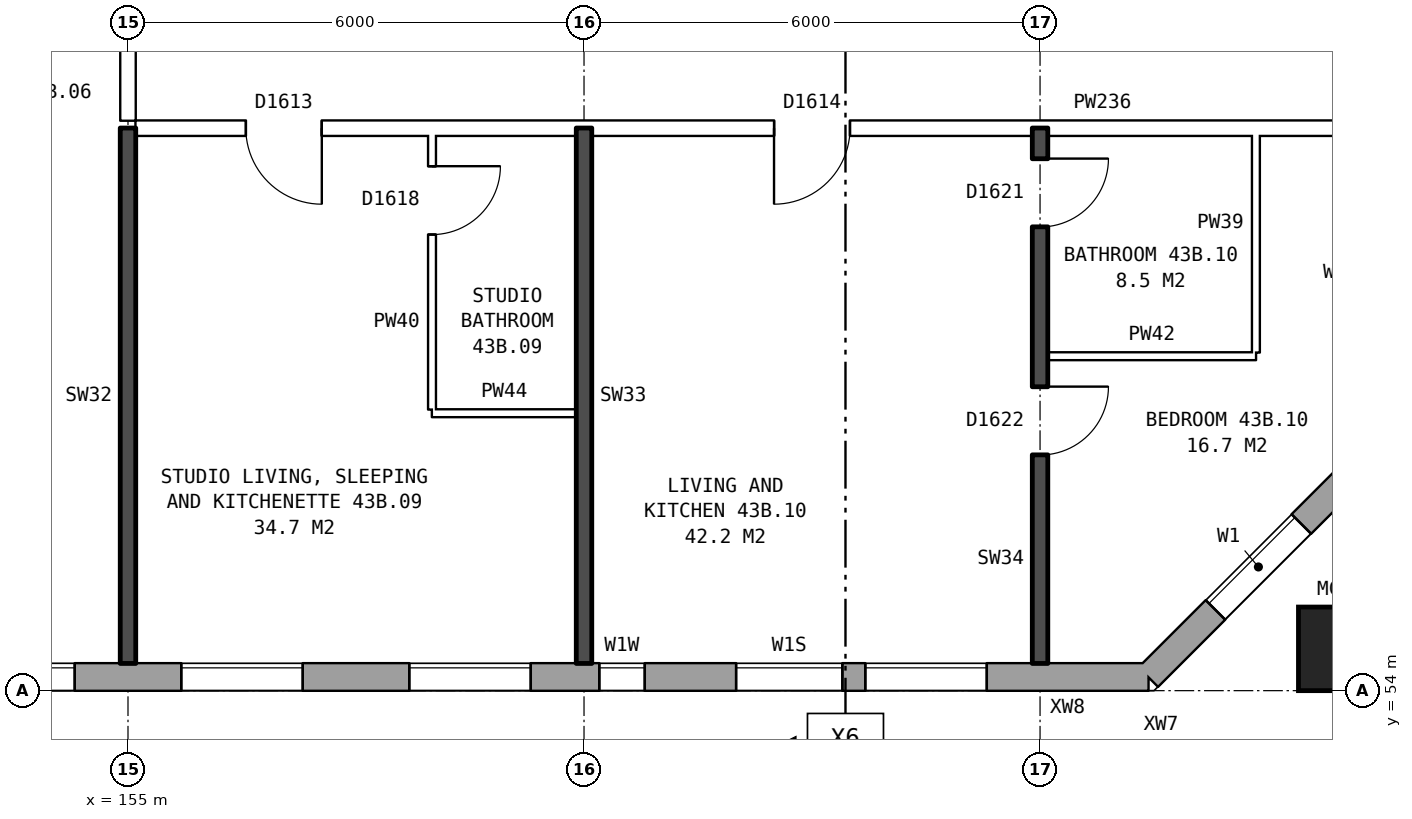
"""IFC4 building model, lengths in metres.
Left out: names, types, materials, properties, quantities, classifications, styles, units other than length and angle.
Written with IfcOpenShell. Run it as: python <this file> out.ifc"""

import sys

from ifc_helpers import new_model, si_unit, direction, frame, frame_2d, origin, origin_2d, place, context, subcontext, project, spatial, rectangle, hollow_rectangle, extrude, element, fill, save


model = new_model("IFC4")
c1 = context("Model", 3, precision=1e-05, world=origin(), true_north=direction((0.0, 1.0)))
c2 = subcontext(c1, "Body", "Model", "MODEL_VIEW")
j1 = project(units=[si_unit("LENGTHUNIT", "METRE"), si_unit("PLANEANGLEUNIT", "RADIAN")], contexts=[c1])
p1 = place(None, origin())
s1 = spatial("IfcSite", under=j1, at=p1, CompositionType="ELEMENT")
p2 = place(p1, origin())
s2 = spatial("IfcBuilding", under=s1, at=p2, CompositionType="ELEMENT")
p3 = place(p2, frame((0.0, 0.0, 154.7)))
s3 = spatial("IfcBuildingStorey", under=s2, at=p3, CompositionType="ELEMENT", Elevation=154.7)
p4 = place(p3, frame((170.95, 54.55, 0.0), z_axis=(0.0, 0.0, 1.0), x_axis=(1.0, 0.0, 0.0)))
e1 = element("IfcColumn", 1, at=p4, inside=s3, PredefinedType="COLUMN", context=c2, shape_type="SweptSolid", body=[
    extrude(hollow_rectangle(XDim=1.1, YDim=1.1, WallThickness=0.06, at=origin_2d()), origin(), (0.0, 0.0, 1.0), 3.1),
])
p5 = place(p3, frame((134.075, 54.18, 0.0), z_axis=(0.0, 0.0, 1.0), x_axis=(1.0, 0.0, 0.0)))
e2 = element("IfcWall", 2, at=p5, inside=s3, PredefinedType="STANDARD", context=c2, shape_type="SweptSolid", body=[
    extrude(rectangle(XDim=34.351, YDim=0.36, at=frame_2d((17.175, 0.0))), origin(), (0.0, 0.0, 1.0), 2.85),
])
p6 = place(p5, frame((0.625, 0.0, 0.8)))
e3 = element("IfcOpeningElement", 3, at=p6, cuts=e2, PredefinedType="OPENING", context=c2, shape_type="SweptSolid", body=[
    extrude(rectangle(XDim=1.6, YDim=1.8, at=frame_2d((0.8, 0.9))), frame((0.0, 0.19, 0.0), z_axis=(0.0, -1.0, 0.0), x_axis=(1.0, 0.0, 0.0)), (0.0, 0.0, 1.0), 0.38),
])
p7 = place(p5, frame((3.125, 0.0, 0.8)))
e4 = element("IfcOpeningElement", 4, at=p7, cuts=e2, PredefinedType="OPENING", context=c2, shape_type="SweptSolid", body=[
    extrude(rectangle(XDim=1.2, YDim=1.8, at=frame_2d((0.6, 0.9))), frame((0.0, 0.19, 0.0), z_axis=(0.0, -1.0, 0.0), x_axis=(1.0, 0.0, 0.0)), (0.0, 0.0, 1.0), 0.38),
])
p8 = place(p5, frame((4.625, 0.0, 1.7)))
e5 = element("IfcOpeningElement", 5, at=p8, cuts=e2, PredefinedType="OPENING", context=c2, shape_type="SweptSolid", body=[
    extrude(rectangle(XDim=0.8, YDim=0.9, at=frame_2d((0.4, 0.45))), frame((0.0, 0.19, 0.0), z_axis=(0.0, -1.0, 0.0), x_axis=(1.0, 0.0, 0.0)), (0.0, 0.0, 1.0), 0.38),
])
p9 = place(p5, frame((9.625, 0.0, 0.8)))
e6 = element("IfcOpeningElement", 6, at=p9, cuts=e2, PredefinedType="OPENING", context=c2, shape_type="SweptSolid", body=[
    extrude(rectangle(XDim=1.6, YDim=1.8, at=frame_2d((0.8, 0.9))), frame((0.0, 0.19, 0.0), z_axis=(0.0, -1.0, 0.0), x_axis=(1.0, 0.0, 0.0)), (0.0, 0.0, 1.0), 0.38),
])
p10 = place(p5, frame((12.625, 0.0, 0.8)))
e7 = element("IfcOpeningElement", 7, at=p10, cuts=e2, PredefinedType="OPENING", context=c2, shape_type="SweptSolid", body=[
    extrude(rectangle(XDim=1.6, YDim=1.8, at=frame_2d((0.8, 0.9))), frame((0.0, 0.19, 0.0), z_axis=(0.0, -1.0, 0.0), x_axis=(1.0, 0.0, 0.0)), (0.0, 0.0, 1.0), 0.38),
])
p11 = place(p5, frame((15.625, 0.0, 0.8)))
e8 = element("IfcOpeningElement", 8, at=p11, cuts=e2, PredefinedType="OPENING", context=c2, shape_type="SweptSolid", body=[
    extrude(rectangle(XDim=1.6, YDim=1.8, at=frame_2d((0.8, 0.9))), frame((0.0, 0.19, 0.0), z_axis=(0.0, -1.0, 0.0), x_axis=(1.0, 0.0, 0.0)), (0.0, 0.0, 1.0), 0.38),
])
p12 = place(p5, frame((18.625, 0.0, 0.8)))
e9 = element("IfcOpeningElement", 9, at=p12, cuts=e2, PredefinedType="OPENING", context=c2, shape_type="SweptSolid", body=[
    extrude(rectangle(XDim=1.6, YDim=1.8, at=frame_2d((0.8, 0.9))), frame((0.0, 0.19, 0.0), z_axis=(0.0, -1.0, 0.0), x_axis=(1.0, 0.0, 0.0)), (0.0, 0.0, 1.0), 0.38),
])
p13 = place(p5, frame((21.625, 0.0, 0.8)))
e10 = element("IfcOpeningElement", 10, at=p13, cuts=e2, PredefinedType="OPENING", context=c2, shape_type="SweptSolid", body=[
    extrude(rectangle(XDim=1.6, YDim=1.8, at=frame_2d((0.8, 0.9))), frame((0.0, 0.19, 0.0), z_axis=(0.0, -1.0, 0.0), x_axis=(1.0, 0.0, 0.0)), (0.0, 0.0, 1.0), 0.38),
])
p14 = place(p5, frame((24.625, 0.0, 0.8)))
e11 = element("IfcOpeningElement", 11, at=p14, cuts=e2, PredefinedType="OPENING", context=c2, shape_type="SweptSolid", body=[
    extrude(rectangle(XDim=1.6, YDim=1.8, at=frame_2d((0.8, 0.9))), frame((0.0, 0.19, 0.0), z_axis=(0.0, -1.0, 0.0), x_axis=(1.0, 0.0, 0.0)), (0.0, 0.0, 1.0), 0.38),
])
p15 = place(p5, frame((27.125, 0.0, 0.8)))
e12 = element("IfcOpeningElement", 12, at=p15, cuts=e2, PredefinedType="OPENING", context=c2, shape_type="SweptSolid", body=[
    extrude(rectangle(XDim=0.6, YDim=0.9, at=frame_2d((0.3, 0.45))), frame((0.0, 0.19, 0.0), z_axis=(0.0, -1.0, 0.0), x_axis=(1.0, 0.0, 0.0)), (0.0, 0.0, 1.0), 0.38),
])
p16 = place(p5, frame((30.625, 0.0, 0.8)))
e13 = element("IfcOpeningElement", 13, at=p16, cuts=e2, PredefinedType="OPENING", context=c2, shape_type="SweptSolid", body=[
    extrude(rectangle(XDim=1.6, YDim=1.8, at=frame_2d((0.8, 0.9))), frame((0.0, 0.19, 0.0), z_axis=(0.0, -1.0, 0.0), x_axis=(1.0, 0.0, 0.0)), (0.0, 0.0, 1.0), 0.38),
])
p17 = place(p5, frame((6.625, 0.0, 0.8)))
e14 = element("IfcOpeningElement", 14, at=p17, cuts=e2, PredefinedType="OPENING", context=c2, shape_type="SweptSolid", body=[
    extrude(rectangle(XDim=0.8, YDim=0.9, at=frame_2d((0.4, 0.45))), frame((0.0, 0.19, 0.0), z_axis=(0.0, -1.0, 0.0), x_axis=(1.0, 0.0, 0.0)), (0.0, 0.0, 1.0), 0.38),
])
p18 = place(p5, frame((7.725, 0.0, 0.8)))
e15 = element("IfcOpeningElement", 15, at=p18, cuts=e2, PredefinedType="OPENING", context=c2, shape_type="SweptSolid", body=[
    extrude(rectangle(XDim=1.0, YDim=1.8, at=frame_2d((0.5, 0.9))), frame((0.0, 0.19, 0.0), z_axis=(0.0, -1.0, 0.0), x_axis=(1.0, 0.0, 0.0)), (0.0, 0.0, 1.0), 0.38),
])
p19 = place(p5, frame((28.925, 0.0, 1.7)))
e16 = element("IfcOpeningElement", 16, at=p19, cuts=e2, PredefinedType="OPENING", context=c2, shape_type="SweptSolid", body=[
    extrude(rectangle(XDim=1.4, YDim=0.9, at=frame_2d((0.7, 0.45))), frame((0.0, 0.19, 0.0), z_axis=(0.0, -1.0, 0.0), x_axis=(1.0, 0.0, 0.0)), (0.0, 0.0, 1.0), 0.38),
])
p20 = place(p3, frame((168.425, 54.18, 0.0), z_axis=(0.0, 0.0, 1.0), x_axis=(0.707106781187, 0.707106781187, 0.0)))
e17 = element("IfcWall", 17, at=p20, inside=s3, PredefinedType="STANDARD", context=c2, shape_type="SweptSolid", body=[
    extrude(rectangle(XDim=4.094, YDim=0.36, at=frame_2d((2.047, 0.0))), origin(), (0.0, 0.0, 1.0), 2.85),
])
p21 = place(p20, frame((1.247, 0.0, 0.8)))
e18 = element("IfcOpeningElement", 18, at=p21, cuts=e17, PredefinedType="OPENING", context=c2, shape_type="SweptSolid", body=[
    extrude(rectangle(XDim=1.6, YDim=1.8, at=frame_2d((0.8, 0.9))), frame((0.0, 0.19, 0.0), z_axis=(0.0, -1.0, 0.0), x_axis=(1.0, 0.0, 0.0)), (0.0, 0.0, 1.0), 0.38),
])
p22 = place(p3, frame((159.0, 57.65, 0.0), z_axis=(0.0, 0.0, 1.0), x_axis=(1.0, 0.0, 0.0)))
e19 = element("IfcWall", 19, at=p22, inside=s3, PredefinedType="PARTITIONING", context=c2, shape_type="SweptSolid", body=[
    extrude(rectangle(XDim=1.9, YDim=0.1, at=frame_2d((0.95, 0.0))), origin(), (0.0, 0.0, 1.0), 2.85),
])
p23 = place(p3, frame((167.1, 58.4, 0.0), z_axis=(0.0, 0.0, 1.0), x_axis=(1.0, 0.0, 0.0)))
e20 = element("IfcWall", 20, at=p23, inside=s3, PredefinedType="PARTITIONING", context=c2, shape_type="SweptSolid", body=[
    extrude(rectangle(XDim=2.74, YDim=0.1, at=frame_2d((1.37, 0.0))), origin(), (0.0, 0.0, 1.0), 2.85),
])
p24 = place(p3, frame((155.1, 61.4, 0.0), z_axis=(0.0, 0.0, 1.0), x_axis=(1.0, 0.0, 0.0)))
e21 = element("IfcWall", 21, at=p24, inside=s3, PredefinedType="PARTITIONING", context=c2, shape_type="SweptSolid", body=[
    extrude(rectangle(XDim=16.04, YDim=0.2, at=frame_2d((8.02, 0.0))), origin(), (0.0, 0.0, 1.0), 2.85),
])
p25 = place(p24, frame((1.45, 0.0, 0.0)))
e22 = element("IfcOpeningElement", 22, at=p25, cuts=e21, PredefinedType="OPENING", context=c2, shape_type="SweptSolid", body=[
    extrude(rectangle(XDim=1.0, YDim=2.1, at=frame_2d((0.5, 1.05))), frame((0.0, 0.11, 0.0), z_axis=(0.0, -1.0, 0.0), x_axis=(1.0, 0.0, 0.0)), (0.0, 0.0, 1.0), 0.22),
])
p26 = place(p24, frame((8.4, 0.0, 0.0)))
e23 = element("IfcOpeningElement", 23, at=p26, cuts=e21, PredefinedType="OPENING", context=c2, shape_type="SweptSolid", body=[
    extrude(rectangle(XDim=1.0, YDim=2.1, at=frame_2d((0.5, 1.05))), frame((0.0, 0.11, 0.0), z_axis=(0.0, -1.0, 0.0), x_axis=(1.0, 0.0, 0.0)), (0.0, 0.0, 1.0), 0.22),
])
p27 = place(p3, frame((155.0, 54.36, 0.0), z_axis=(0.0, 0.0, 1.0), x_axis=(0.0, 1.0, 0.0)))
e24 = element("IfcWall", 24, at=p27, inside=s3, PredefinedType="SOLIDWALL", context=c2, shape_type="SweptSolid", body=[
    extrude(rectangle(XDim=7.04, YDim=0.2, at=frame_2d((3.52, 0.0))), origin(), (0.0, 0.0, 1.0), 2.85),
])
p28 = place(p3, frame((155.0, 61.5, 0.0), z_axis=(0.0, 0.0, 1.0), x_axis=(0.0, 1.0, 0.0)))
e25 = element("IfcWall", 25, at=p28, inside=s3, PredefinedType="PARTITIONING", context=c2, shape_type="SweptSolid", body=[
    extrude(rectangle(XDim=2.2, YDim=0.2, at=frame_2d((1.1, 0.0))), origin(), (0.0, 0.0, 1.0), 2.85),
])
p29 = place(p3, frame((159.0, 57.7, 0.0), z_axis=(0.0, 0.0, 1.0), x_axis=(0.0, 1.0, 0.0)))
e26 = element("IfcWall", 26, at=p29, inside=s3, PredefinedType="PARTITIONING", context=c2, shape_type="SweptSolid", body=[
    extrude(rectangle(XDim=3.6, YDim=0.1, at=frame_2d((1.8, 0.0))), origin(), (0.0, 0.0, 1.0), 2.85),
])
p30 = place(p29, frame((2.3, 0.0, 0.0)))
e27 = element("IfcOpeningElement", 27, at=p30, cuts=e26, PredefinedType="OPENING", context=c2, shape_type="SweptSolid", body=[
    extrude(rectangle(XDim=0.9, YDim=2.1, at=frame_2d((0.45, 1.05))), frame((0.0, 0.06, 0.0), z_axis=(0.0, -1.0, 0.0), x_axis=(1.0, 0.0, 0.0)), (0.0, 0.0, 1.0), 0.12),
])
p31 = place(p3, frame((161.0, 54.36, 0.0), z_axis=(0.0, 0.0, 1.0), x_axis=(0.0, 1.0, 0.0)))
e28 = element("IfcWall", 28, at=p31, inside=s3, PredefinedType="SOLIDWALL", context=c2, shape_type="SweptSolid", body=[
    extrude(rectangle(XDim=7.04, YDim=0.2, at=frame_2d((3.52, 0.0))), origin(), (0.0, 0.0, 1.0), 2.85),
])
p32 = place(p3, frame((167.0, 54.36, 0.0), z_axis=(0.0, 0.0, 1.0), x_axis=(0.0, 1.0, 0.0)))
e29 = element("IfcWall", 29, at=p32, inside=s3, PredefinedType="SOLIDWALL", context=c2, shape_type="SweptSolid", body=[
    extrude(rectangle(XDim=7.04, YDim=0.2, at=frame_2d((3.52, 0.0))), origin(), (0.0, 0.0, 1.0), 2.85),
])
p33 = place(p32, frame((2.74, 0.0, 0.0)))
e30 = element("IfcOpeningElement", 30, at=p33, cuts=e29, PredefinedType="OPENING", context=c2, shape_type="SweptSolid", body=[
    extrude(rectangle(XDim=0.9, YDim=2.1, at=frame_2d((0.45, 1.05))), frame((0.0, 0.11, 0.0), z_axis=(0.0, -1.0, 0.0), x_axis=(1.0, 0.0, 0.0)), (0.0, 0.0, 1.0), 0.22),
])
p34 = place(p32, frame((5.74, 0.0, 0.0)))
e31 = element("IfcOpeningElement", 31, at=p34, cuts=e29, PredefinedType="OPENING", context=c2, shape_type="SweptSolid", body=[
    extrude(rectangle(XDim=0.9, YDim=2.1, at=frame_2d((0.45, 1.05))), frame((0.0, 0.11, 0.0), z_axis=(0.0, -1.0, 0.0), x_axis=(1.0, 0.0, 0.0)), (0.0, 0.0, 1.0), 0.22),
])
p35 = place(p3, frame((169.84, 58.45, 0.0), z_axis=(0.0, 0.0, 1.0), x_axis=(0.0, 1.0, 0.0)))
e32 = element("IfcWall", 32, at=p35, inside=s3, PredefinedType="PARTITIONING", context=c2, shape_type="SweptSolid", body=[
    extrude(rectangle(XDim=2.85, YDim=0.1, at=frame_2d((1.425, 0.0))), origin(), (0.0, 0.0, 1.0), 2.85),
])
p36 = place(p12, origin())
e33 = element("IfcWindow", 33, at=p36, inside=s3, PartitioningType="SINGLE_PANEL", PredefinedType="WINDOW", context=c2, shape_type="SweptSolid", body=[
    extrude(rectangle(XDim=1.6, YDim=1.8, at=frame_2d((0.8, 0.9))), frame((0.0, 0.15, 0.0), z_axis=(0.0, -1.0, 0.0), x_axis=(1.0, 0.0, 0.0)), (0.0, 0.0, 1.0), 0.06),
])
fill(e9, e33)
p37 = place(p13, origin())
e34 = element("IfcWindow", 34, at=p37, inside=s3, PartitioningType="SINGLE_PANEL", PredefinedType="WINDOW", context=c2, shape_type="SweptSolid", body=[
    extrude(rectangle(XDim=1.6, YDim=1.8, at=frame_2d((0.8, 0.9))), frame((0.0, 0.15, 0.0), z_axis=(0.0, -1.0, 0.0), x_axis=(1.0, 0.0, 0.0)), (0.0, 0.0, 1.0), 0.06),
])
fill(e10, e34)
p38 = place(p14, origin())
e35 = element("IfcWindow", 35, at=p38, inside=s3, PartitioningType="SINGLE_PANEL", PredefinedType="WINDOW", context=c2, shape_type="SweptSolid", body=[
    extrude(rectangle(XDim=1.6, YDim=1.8, at=frame_2d((0.8, 0.9))), frame((0.0, 0.15, 0.0), z_axis=(0.0, -1.0, 0.0), x_axis=(1.0, 0.0, 0.0)), (0.0, 0.0, 1.0), 0.06),
])
fill(e11, e35)
p39 = place(p15, origin())
e36 = element("IfcWindow", 36, at=p39, inside=s3, PartitioningType="SINGLE_PANEL", PredefinedType="WINDOW", context=c2, shape_type="SweptSolid", body=[
    extrude(rectangle(XDim=0.6, YDim=0.9, at=frame_2d((0.3, 0.45))), frame((0.0, 0.15, 0.0), z_axis=(0.0, -1.0, 0.0), x_axis=(1.0, 0.0, 0.0)), (0.0, 0.0, 1.0), 0.06),
])
fill(e12, e36)
p40 = place(p16, origin())
e37 = element("IfcWindow", 37, at=p40, inside=s3, PartitioningType="SINGLE_PANEL", PredefinedType="WINDOW", context=c2, shape_type="SweptSolid", body=[
    extrude(rectangle(XDim=1.6, YDim=1.8, at=frame_2d((0.8, 0.9))), frame((0.0, 0.15, 0.0), z_axis=(0.0, -1.0, 0.0), x_axis=(1.0, 0.0, 0.0)), (0.0, 0.0, 1.0), 0.06),
])
fill(e13, e37)
p41 = place(p21, origin())
e38 = element("IfcWindow", 38, at=p41, inside=s3, PartitioningType="SINGLE_PANEL", PredefinedType="WINDOW", context=c2, shape_type="SweptSolid", body=[
    extrude(rectangle(XDim=1.6, YDim=1.8, at=frame_2d((0.8, 0.9))), frame((0.0, 0.15, 0.0), z_axis=(0.0, -1.0, 0.0), x_axis=(1.0, 0.0, 0.0)), (0.0, 0.0, 1.0), 0.06),
])
fill(e18, e38)
p42 = place(p25, frame((1.0, 0.0, 0.0), z_axis=(0.0, 0.0, 1.0), x_axis=(-1.0, 0.0, 0.0)))
e39 = element("IfcDoor", 39, at=p42, inside=s3, OperationType="SINGLE_SWING_LEFT", PredefinedType="DOOR", context=c2, shape_type="SweptSolid", body=[
    extrude(rectangle(XDim=1.0, YDim=2.1, at=frame_2d((0.5, 1.05))), frame((0.0, 0.025, 0.0), z_axis=(0.0, -1.0, 0.0), x_axis=(1.0, 0.0, 0.0)), (0.0, 0.0, 1.0), 0.05),
])
fill(e22, e39)
p43 = place(p30, frame((0.9, 0.0, 0.0), z_axis=(0.0, 0.0, 1.0), x_axis=(-1.0, 0.0, 0.0)))
e40 = element("IfcDoor", 40, at=p43, inside=s3, OperationType="SINGLE_SWING_LEFT", PredefinedType="DOOR", context=c2, shape_type="SweptSolid", body=[
    extrude(rectangle(XDim=0.9, YDim=2.1, at=frame_2d((0.45, 1.05))), frame((0.0, 0.025, 0.0), z_axis=(0.0, -1.0, 0.0), x_axis=(1.0, 0.0, 0.0)), (0.0, 0.0, 1.0), 0.05),
])
fill(e27, e40)
p44 = place(p33, frame((0.9, 0.0, 0.0), z_axis=(0.0, 0.0, 1.0), x_axis=(-1.0, 0.0, 0.0)))
e41 = element("IfcDoor", 41, at=p44, inside=s3, OperationType="SINGLE_SWING_LEFT", PredefinedType="DOOR", context=c2, shape_type="SweptSolid", body=[
    extrude(rectangle(XDim=0.9, YDim=2.1, at=frame_2d((0.45, 1.05))), frame((0.0, 0.025, 0.0), z_axis=(0.0, -1.0, 0.0), x_axis=(1.0, 0.0, 0.0)), (0.0, 0.0, 1.0), 0.05),
])
fill(e30, e41)
p45 = place(p26, frame((1.0, 0.0, 0.0), z_axis=(0.0, 0.0, 1.0), x_axis=(-1.0, 0.0, 0.0)))
e42 = element("IfcDoor", 42, at=p45, inside=s3, OperationType="SINGLE_SWING_RIGHT", PredefinedType="DOOR", context=c2, shape_type="SweptSolid", body=[
    extrude(rectangle(XDim=1.0, YDim=2.1, at=frame_2d((0.5, 1.05))), frame((0.0, 0.025, 0.0), z_axis=(0.0, -1.0, 0.0), x_axis=(1.0, 0.0, 0.0)), (0.0, 0.0, 1.0), 0.05),
])
fill(e23, e42)
p46 = place(p34, frame((0.9, 0.0, 0.0), z_axis=(0.0, 0.0, 1.0), x_axis=(-1.0, 0.0, 0.0)))
e43 = element("IfcDoor", 43, at=p46, inside=s3, OperationType="SINGLE_SWING_LEFT", PredefinedType="DOOR", context=c2, shape_type="SweptSolid", body=[
    extrude(rectangle(XDim=0.9, YDim=2.1, at=frame_2d((0.45, 1.05))), frame((0.0, 0.025, 0.0), z_axis=(0.0, -1.0, 0.0), x_axis=(1.0, 0.0, 0.0)), (0.0, 0.0, 1.0), 0.05),
])
fill(e31, e43)
p47 = place(p19, origin())
e44 = element("IfcWindow", 44, at=p47, inside=s3, PartitioningType="SINGLE_PANEL", PredefinedType="WINDOW", context=c2, shape_type="SweptSolid", body=[
    extrude(rectangle(XDim=1.4, YDim=0.9, at=frame_2d((0.7, 0.45))), frame((0.0, 0.15, 0.0), z_axis=(0.0, -1.0, 0.0), x_axis=(1.0, 0.0, 0.0)), (0.0, 0.0, 1.0), 0.06),
])
fill(e16, e44)
save(model, sys.argv[1])
